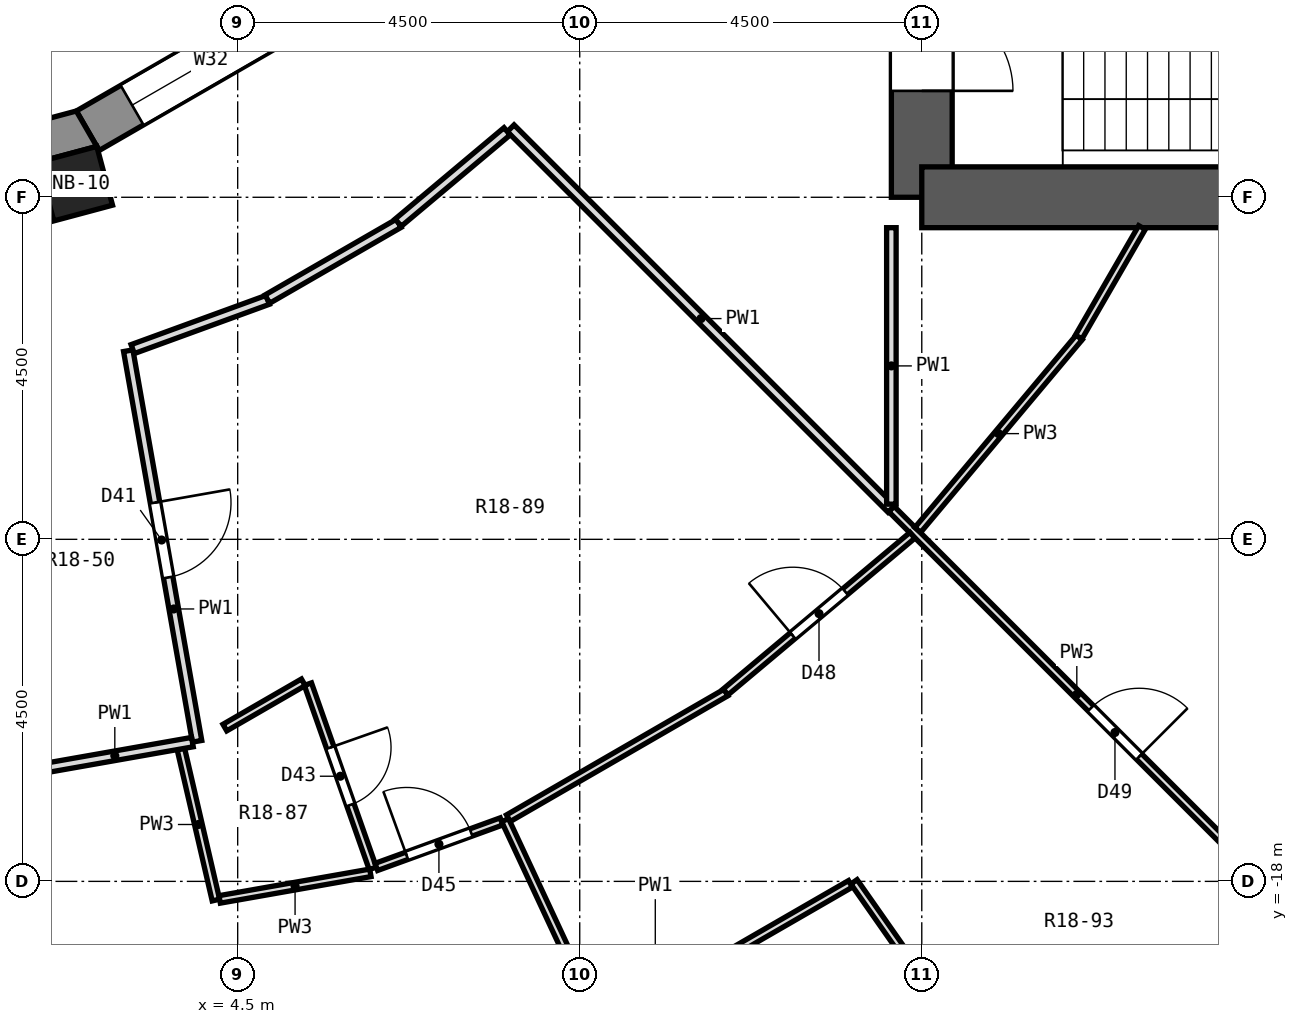
"""IFC4 building model, lengths in metres.
Left out: names, types, materials, properties, quantities, classifications, styles, units other than length and angle.
Written with IfcOpenShell. Run it as: python <this file> out.ifc"""

import sys

from ifc_helpers import new_model, si_unit, direction, frame, frame_2d, origin, origin_2d, place, context, subcontext, project, spatial, polyline, rectangle, outline, extrude, element, fill, save


model = new_model("IFC4")
c1 = context("Model", 3, precision=1e-05, world=origin(), true_north=direction((0.0, 1.0)))
c2 = subcontext(c1, "Body", "Model", "MODEL_VIEW")
j1 = project(units=[si_unit("LENGTHUNIT", "METRE"), si_unit("PLANEANGLEUNIT", "RADIAN")], contexts=[c1])
p1 = place(None, origin())
s1 = spatial("IfcSite", under=j1, at=p1, CompositionType="ELEMENT")
p2 = place(p1, origin())
s2 = spatial("IfcBuilding", under=s1, at=p2, CompositionType="ELEMENT")
p3 = place(p2, frame((0.0, 0.0, 101.8)))
s3 = spatial("IfcBuildingStorey", under=s2, at=p3, CompositionType="ELEMENT", Elevation=101.8)
p4 = place(p3, frame((2.364, -8.821, 0.0), z_axis=(0.0, 0.0, 1.0), x_axis=(0.258819045103, -0.965925826289, 0.0)))
e1 = element("IfcColumn", 1, at=p4, inside=s3, PredefinedType="COLUMN", context=c2, shape_type="SweptSolid", body=[
    extrude(rectangle(XDim=0.8, YDim=0.8, at=origin_2d()), origin(), (0.0, 0.0, 1.0), 3.3),
])
p5 = place(p3, frame((13.5, -9.0, 0.0), z_axis=(0.0, 0.0, 1.0), x_axis=(0.0, 1.0, 0.0)))
e2 = element("IfcWall", 2, at=p5, inside=s3, PredefinedType="SHEAR", context=c2, shape_type="SweptSolid", body=[
    extrude(rectangle(XDim=18.0, YDim=0.8, at=frame_2d((9.0, 0.0))), origin(), (0.0, 0.0, 1.0), 3.3),
])
p6 = place(p5, frame((15.4, 0.0, 0.0)))
e3 = element("IfcOpeningElement", 3, at=p6, cuts=e2, PredefinedType="OPENING", context=c2, shape_type="SweptSolid", body=[
    extrude(rectangle(XDim=1.2, YDim=2.1, at=frame_2d((0.6, 1.05))), frame((0.0, 0.412, 0.0), z_axis=(0.0, -1.0, 0.0), x_axis=(1.0, 0.0, 0.0)), (0.0, 0.0, 1.0), 0.824),
])
p7 = place(p5, frame((1.4, 0.0, 0.0)))
e4 = element("IfcOpeningElement", 4, at=p7, cuts=e2, PredefinedType="OPENING", context=c2, shape_type="SweptSolid", body=[
    extrude(rectangle(XDim=1.2, YDim=2.1, at=frame_2d((0.6, 1.05))), frame((0.0, 0.412, 0.0), z_axis=(0.0, -1.0, 0.0), x_axis=(1.0, 0.0, 0.0)), (0.0, 0.0, 1.0), 0.824),
])
p8 = place(p5, frame((7.5, 0.0, 0.0)))
e5 = element("IfcOpeningElement", 5, at=p8, cuts=e2, PredefinedType="OPENING", context=c2, shape_type="SweptSolid", body=[
    extrude(rectangle(XDim=3.0, YDim=2.4, at=frame_2d((1.5, 1.2))), frame((0.0, 0.412, 0.0), z_axis=(0.0, -1.0, 0.0), x_axis=(1.0, 0.0, 0.0)), (0.0, 0.0, 1.0), 0.824),
])
p9 = place(p3, frame((13.5, -9.0, 0.0), z_axis=(0.0, 0.0, 1.0), x_axis=(1.0, 0.0, 0.0)))
e6 = element("IfcWall", 6, at=p9, inside=s3, PredefinedType="SHEAR", context=c2, shape_type="SweptSolid", body=[
    extrude(rectangle(XDim=10.4, YDim=0.8, at=frame_2d((5.2, 0.0))), origin(), (0.0, 0.0, 1.0), 3.3),
])
p10 = place(p3, frame((2.527, -8.125, 0.0), z_axis=(0.0, 0.0, 1.0), x_axis=(0.86604563398, 0.499964958637, 0.0)))
e7 = element("IfcWall", 7, at=p10, inside=s3, PredefinedType="SOLIDWALL", context=c2, shape_type="SweptSolid", body=[
    extrude(rectangle(XDim=3.747, YDim=0.6, at=frame_2d((1.874, 0.0))), origin(), (0.0, 0.0, 1.0), 2.8),
])
p11 = place(p10, frame((0.674, 0.0, 0.9)))
e8 = element("IfcOpeningElement", 8, at=p11, cuts=e7, PredefinedType="OPENING", context=c2, shape_type="SweptSolid", body=[
    extrude(rectangle(XDim=2.4, YDim=1.8, at=frame_2d((1.2, 0.9))), frame((0.0, 0.312, 0.0), z_axis=(0.0, -1.0, 0.0), x_axis=(1.0, 0.0, 0.0)), (0.0, 0.0, 1.0), 0.624),
])
p12 = place(p3, origin())
e9 = element("IfcWall", 9, at=p12, inside=s3, PredefinedType="SOLIDWALL", context=c2, shape_type="SweptSolid", body=[
    extrude(outline(polyline([(2.646, -8.331), (2.377, -7.865), (1.874, -8.0), (1.874, -8.538), (2.646, -8.331)])), origin(), (0.0, 0.0, 1.0), 2.8),
])
p13 = place(p3, frame((3.06, -11.019, 0.0), z_axis=(0.0, 0.0, 1.0), x_axis=(0.173641190819, -0.984808984956, 0.0)))
e10 = element("IfcWall", 10, at=p13, inside=s3, PredefinedType="PARTITIONING", context=c2, shape_type="SweptSolid", body=[
    extrude(rectangle(XDim=5.218, YDim=0.125, at=frame_2d((2.609, 0.0))), origin(), (0.0, 0.0, 1.0), 2.8),
])
p14 = place(p13, frame((2.029, 0.0, 0.0)))
e11 = element("IfcOpeningElement", 11, at=p14, cuts=e10, PredefinedType="OPENING", context=c2, shape_type="SweptSolid", body=[
    extrude(rectangle(XDim=1.0, YDim=2.1, at=frame_2d((0.5, 1.05))), frame((0.0, 0.074, 0.0), z_axis=(0.0, -1.0, 0.0), x_axis=(1.0, 0.0, 0.0)), (0.0, 0.0, 1.0), 0.149),
])
p15 = place(p3, frame((3.753, -16.258, 0.0), z_axis=(0.0, 0.0, 1.0), x_axis=(0.22577693712, -0.974179025983, 0.0)))
e12 = element("IfcWall", 12, at=p15, inside=s3, PredefinedType="PARTITIONING", context=c2, shape_type="SweptSolid", body=[
    extrude(rectangle(XDim=2.041, YDim=0.1, at=frame_2d((1.02, 0.0))), origin(), (0.0, 0.0, 1.0), 2.8),
])
p16 = place(p3, frame((5.424, -15.405, 0.0), z_axis=(0.0, 0.0, 1.0), x_axis=(0.332059637914, -0.943258393479, 0.0)))
e13 = element("IfcWall", 13, at=p16, inside=s3, PredefinedType="PARTITIONING", context=c2, shape_type="SweptSolid", body=[
    extrude(rectangle(XDim=2.57, YDim=0.1, at=frame_2d((1.285, 0.0))), origin(), (0.0, 0.0, 1.0), 2.8),
])
p17 = place(p16, frame((0.885, 0.0, 0.0)))
e14 = element("IfcOpeningElement", 14, at=p17, cuts=e13, PredefinedType="OPENING", context=c2, shape_type="SweptSolid", body=[
    extrude(rectangle(XDim=0.8, YDim=2.1, at=frame_2d((0.4, 1.05))), frame((0.0, 0.062, 0.0), z_axis=(0.0, -1.0, 0.0), x_axis=(1.0, 0.0, 0.0)), (0.0, 0.0, 1.0), 0.124),
])
p18 = place(p3, frame((8.018, -17.194, 0.0), z_axis=(0.0, 0.0, 1.0), x_axis=(0.422490057257, -0.906367558731, 0.0)))
e15 = element("IfcWall", 15, at=p18, inside=s3, PredefinedType="PARTITIONING", context=c2, shape_type="SweptSolid", body=[
    extrude(rectangle(XDim=6.693, YDim=0.1, at=frame_2d((3.347, 0.0))), origin(), (0.0, 0.0, 1.0), 2.8),
])
p19 = place(p3, frame((12.608, -18.006, 0.0), z_axis=(0.0, 0.0, 1.0), x_axis=(0.573573515593, -0.819154089418, 0.0)))
e16 = element("IfcWall", 16, at=p19, inside=s3, PredefinedType="PARTITIONING", context=c2, shape_type="SweptSolid", body=[
    extrude(rectangle(XDim=2.358, YDim=0.1, at=frame_2d((1.179, 0.0))), origin(), (0.0, 0.0, 1.0), 2.8),
])
p20 = place(p3, frame((13.1, -13.1, 0.0), z_axis=(0.0, 0.0, 1.0), x_axis=(0.707192272448, -0.707021279588, 0.0)))
e17 = element("IfcWall", 17, at=p20, inside=s3, PredefinedType="PARTITIONING", context=c2, shape_type="SweptSolid", body=[
    extrude(rectangle(XDim=7.139, YDim=0.1, at=frame_2d((3.569, 0.0))), origin(), (0.0, 0.0, 1.0), 2.8),
])
p21 = place(p20, frame((3.71, 0.0, 0.0)))
e18 = element("IfcOpeningElement", 18, at=p21, cuts=e17, PredefinedType="OPENING", context=c2, shape_type="SweptSolid", body=[
    extrude(rectangle(XDim=0.9, YDim=2.1, at=frame_2d((0.45, 1.05))), frame((0.0, 0.062, 0.0), z_axis=(0.0, -1.0, 0.0), x_axis=(1.0, 0.0, 0.0)), (0.0, 0.0, 1.0), 0.124),
])
p22 = place(p3, frame((8.092, -8.092, 0.0), z_axis=(0.0, 0.0, 1.0), x_axis=(0.707106781187, -0.707106781187, 0.0)))
e19 = element("IfcWall", 19, at=p22, inside=s3, PredefinedType="PARTITIONING", context=c2, shape_type="SweptSolid", body=[
    extrude(rectangle(XDim=7.083, YDim=0.125, at=frame_2d((3.541, 0.0))), origin(), (0.0, 0.0, 1.0), 2.8),
])
p23 = place(p3, frame((4.263, -18.237, 0.0), z_axis=(0.0, 0.0, 1.0), x_axis=(0.984827477251, 0.173536278777, 0.0)))
e20 = element("IfcWall", 20, at=p23, inside=s3, PredefinedType="PARTITIONING", context=c2, shape_type="SweptSolid", body=[
    extrude(rectangle(XDim=2.013, YDim=0.1, at=frame_2d((1.007, 0.0))), origin(), (0.0, 0.0, 1.0), 2.8),
])
p24 = place(p3, frame((1.862, -16.528, 0.0), z_axis=(0.0, 0.0, 1.0), x_axis=(0.984827380623, 0.173536827142, 0.0)))
e21 = element("IfcWall", 21, at=p24, inside=s3, PredefinedType="PARTITIONING", context=c2, shape_type="SweptSolid", body=[
    extrude(rectangle(XDim=2.074, YDim=0.125, at=frame_2d((1.037, 0.0))), origin(), (0.0, 0.0, 1.0), 2.8),
])
p25 = place(p3, frame((6.324, -17.81, 0.0), z_axis=(0.0, 0.0, 1.0), x_axis=(0.939842226204, 0.341608825771, 0.0)))
e22 = element("IfcWall", 22, at=p25, inside=s3, PredefinedType="PARTITIONING", context=c2, shape_type="SweptSolid", body=[
    extrude(rectangle(XDim=1.752, YDim=0.1, at=frame_2d((0.876, 0.0))), origin(), (0.0, 0.0, 1.0), 2.8),
])
p26 = place(p25, frame((0.426, 0.0, 0.0)))
e23 = element("IfcOpeningElement", 23, at=p26, cuts=e22, PredefinedType="OPENING", context=c2, shape_type="SweptSolid", body=[
    extrude(rectangle(XDim=0.9, YDim=2.1, at=frame_2d((0.45, 1.05))), frame((0.0, 0.062, 0.0), z_axis=(0.0, -1.0, 0.0), x_axis=(1.0, 0.0, 0.0)), (0.0, 0.0, 1.0), 0.124),
])
p27 = place(p3, frame((3.119, -10.997, 0.0), z_axis=(0.0, 0.0, 1.0), x_axis=(0.939510386217, 0.342520414269, 0.0)))
e24 = element("IfcWall", 24, at=p27, inside=s3, PredefinedType="PARTITIONING", context=c2, shape_type="SweptSolid", body=[
    extrude(rectangle(XDim=1.891, YDim=0.125, at=frame_2d((0.946, 0.0))), origin(), (0.0, 0.0, 1.0), 2.8),
])
p28 = place(p3, frame((10.741, -19.083, 0.0), z_axis=(0.0, 0.0, 1.0), x_axis=(0.86618365172, 0.499725806311, 0.0)))
e25 = element("IfcWall", 25, at=p28, inside=s3, PredefinedType="PARTITIONING", context=c2, shape_type="SweptSolid", body=[
    extrude(rectangle(XDim=2.101, YDim=0.1, at=frame_2d((1.051, 0.0))), origin(), (0.0, 0.0, 1.0), 2.8),
])
p29 = place(p3, frame((8.061, -17.169, 0.0), z_axis=(0.0, 0.0, 1.0), x_axis=(0.865907705821, 0.500203803465, 0.0)))
e26 = element("IfcWall", 26, at=p29, inside=s3, PredefinedType="PARTITIONING", context=c2, shape_type="SweptSolid", body=[
    extrude(rectangle(XDim=3.307, YDim=0.1, at=frame_2d((1.654, 0.0))), origin(), (0.0, 0.0, 1.0), 2.8),
])
p30 = place(p3, frame((4.331, -15.977, 0.0), z_axis=(0.0, 0.0, 1.0), x_axis=(0.86607987314, 0.499905644439, 0.0)))
e27 = element("IfcWall", 27, at=p30, inside=s3, PredefinedType="PARTITIONING", context=c2, shape_type="SweptSolid", body=[
    extrude(rectangle(XDim=1.192, YDim=0.1, at=frame_2d((0.596, 0.0))), origin(), (0.0, 0.0, 1.0), 2.8),
])
p31 = place(p3, frame((4.89, -10.34, 0.0), z_axis=(0.0, 0.0, 1.0), x_axis=(0.866142818645, 0.499796576329, 0.0)))
e28 = element("IfcWall", 28, at=p31, inside=s3, PredefinedType="PARTITIONING", context=c2, shape_type="SweptSolid", body=[
    extrude(rectangle(XDim=1.996, YDim=0.125, at=frame_2d((0.998, 0.0))), origin(), (0.0, 0.0, 1.0), 2.8),
])
p32 = place(p3, frame((10.919, -15.508, 0.0), z_axis=(0.0, 0.0, 1.0), x_axis=(0.766214515486, 0.642584870861, 0.0)))
e29 = element("IfcWall", 29, at=p32, inside=s3, PredefinedType="PARTITIONING", context=c2, shape_type="SweptSolid", body=[
    extrude(rectangle(XDim=3.207, YDim=0.1, at=frame_2d((1.604, 0.0))), origin(), (0.0, 0.0, 1.0), 2.8),
])
p33 = place(p32, frame((1.154, 0.0, 0.0)))
e30 = element("IfcOpeningElement", 30, at=p33, cuts=e29, PredefinedType="OPENING", context=c2, shape_type="SweptSolid", body=[
    extrude(rectangle(XDim=0.9, YDim=2.1, at=frame_2d((0.45, 1.05))), frame((0.0, 0.062, 0.0), z_axis=(0.0, -1.0, 0.0), x_axis=(1.0, 0.0, 0.0)), (0.0, 0.0, 1.0), 0.124),
])
p34 = place(p3, frame((6.612, -9.334, 0.0), z_axis=(0.0, 0.0, 1.0), x_axis=(0.766118936526, 0.642698821453, 0.0)))
e31 = element("IfcWall", 31, at=p34, inside=s3, PredefinedType="PARTITIONING", context=c2, shape_type="SweptSolid", body=[
    extrude(rectangle(XDim=1.869, YDim=0.125, at=frame_2d((0.935, 0.0))), origin(), (0.0, 0.0, 1.0), 2.8),
])
p35 = place(p3, frame((13.447, -13.377, 0.0), z_axis=(0.0, 0.0, 1.0), x_axis=(0.642547967595, 0.76624546285, 0.0)))
e32 = element("IfcWall", 32, at=p35, inside=s3, PredefinedType="PARTITIONING", context=c2, shape_type="SweptSolid", body=[
    extrude(rectangle(XDim=3.308, YDim=0.1, at=frame_2d((1.654, 0.0))), origin(), (0.0, 0.0, 1.0), 2.8),
])
p36 = place(p3, frame((15.565, -10.838, 0.0), z_axis=(0.0, 0.0, 1.0), x_axis=(0.500370548049, 0.865811362044, 0.0)))
e33 = element("IfcWall", 33, at=p36, inside=s3, PredefinedType="PARTITIONING", context=c2, shape_type="SweptSolid", body=[
    extrude(rectangle(XDim=1.663, YDim=0.1, at=frame_2d((0.832, 0.0))), origin(), (0.0, 0.0, 1.0), 2.8),
])
p37 = place(p3, frame((13.1, -13.038, 0.0), z_axis=(0.0, 0.0, 1.0), x_axis=(0.0, 1.0, 0.0)))
e34 = element("IfcWall", 34, at=p37, inside=s3, PredefinedType="PARTITIONING", context=c2, shape_type="SweptSolid", body=[
    extrude(rectangle(XDim=3.638, YDim=0.125, at=frame_2d((1.819, 0.0))), origin(), (0.0, 0.0, 1.0), 2.8),
])
p38 = place(p11, origin())
e35 = element("IfcWindow", 35, at=p38, inside=s3, PartitioningType="SINGLE_PANEL", PredefinedType="WINDOW", context=c2, shape_type="SweptSolid", body=[
    extrude(rectangle(XDim=2.4, YDim=1.8, at=frame_2d((1.2, 0.9))), frame((0.0, -0.12, 0.0), z_axis=(0.0, -1.0, 0.0), x_axis=(1.0, 0.0, 0.0)), (0.0, 0.0, 1.0), 0.06),
])
fill(e8, e35)
p39 = place(p14, origin())
e36 = element("IfcDoor", 36, at=p39, inside=s3, OperationType="SINGLE_SWING_LEFT", PredefinedType="DOOR", context=c2, shape_type="SweptSolid", body=[
    extrude(rectangle(XDim=1.0, YDim=2.1, at=frame_2d((0.5, 1.05))), frame((0.0, 0.025, 0.0), z_axis=(0.0, -1.0, 0.0), x_axis=(1.0, 0.0, 0.0)), (0.0, 0.0, 1.0), 0.05),
])
fill(e11, e36)
p40 = place(p17, origin())
e37 = element("IfcDoor", 37, at=p40, inside=s3, OperationType="SINGLE_SWING_LEFT", PredefinedType="DOOR", context=c2, shape_type="SweptSolid", body=[
    extrude(rectangle(XDim=0.8, YDim=2.1, at=frame_2d((0.4, 1.05))), frame((0.0, 0.025, 0.0), z_axis=(0.0, -1.0, 0.0), x_axis=(1.0, 0.0, 0.0)), (0.0, 0.0, 1.0), 0.05),
])
fill(e14, e37)
p41 = place(p26, origin())
e38 = element("IfcDoor", 38, at=p41, inside=s3, OperationType="SINGLE_SWING_LEFT", PredefinedType="DOOR", context=c2, shape_type="SweptSolid", body=[
    extrude(rectangle(XDim=0.9, YDim=2.1, at=frame_2d((0.45, 1.05))), frame((0.0, 0.025, 0.0), z_axis=(0.0, -1.0, 0.0), x_axis=(1.0, 0.0, 0.0)), (0.0, 0.0, 1.0), 0.05),
])
fill(e23, e38)
p42 = place(p33, origin())
e39 = element("IfcDoor", 39, at=p42, inside=s3, OperationType="SINGLE_SWING_LEFT", PredefinedType="DOOR", context=c2, shape_type="SweptSolid", body=[
    extrude(rectangle(XDim=0.9, YDim=2.1, at=frame_2d((0.45, 1.05))), frame((0.0, 0.025, 0.0), z_axis=(0.0, -1.0, 0.0), x_axis=(1.0, 0.0, 0.0)), (0.0, 0.0, 1.0), 0.05),
])
fill(e30, e39)
p43 = place(p21, origin())
e40 = element("IfcDoor", 40, at=p43, inside=s3, OperationType="SINGLE_SWING_RIGHT", PredefinedType="DOOR", context=c2, shape_type="SweptSolid", body=[
    extrude(rectangle(XDim=0.9, YDim=2.1, at=frame_2d((0.45, 1.05))), frame((0.0, 0.025, 0.0), z_axis=(0.0, -1.0, 0.0), x_axis=(1.0, 0.0, 0.0)), (0.0, 0.0, 1.0), 0.05),
])
fill(e18, e40)
p44 = place(p7, frame((1.2, 0.0, 0.0), z_axis=(0.0, 0.0, 1.0), x_axis=(-1.0, 0.0, 0.0)))
e41 = element("IfcDoor", 41, at=p44, inside=s3, OperationType="SINGLE_SWING_RIGHT", PredefinedType="DOOR", context=c2, shape_type="SweptSolid", body=[
    extrude(rectangle(XDim=1.2, YDim=2.1, at=frame_2d((0.6, 1.05))), frame((0.0, 0.025, 0.0), z_axis=(0.0, -1.0, 0.0), x_axis=(1.0, 0.0, 0.0)), (0.0, 0.0, 1.0), 0.05),
])
fill(e4, e41)
save(model, sys.argv[1])
